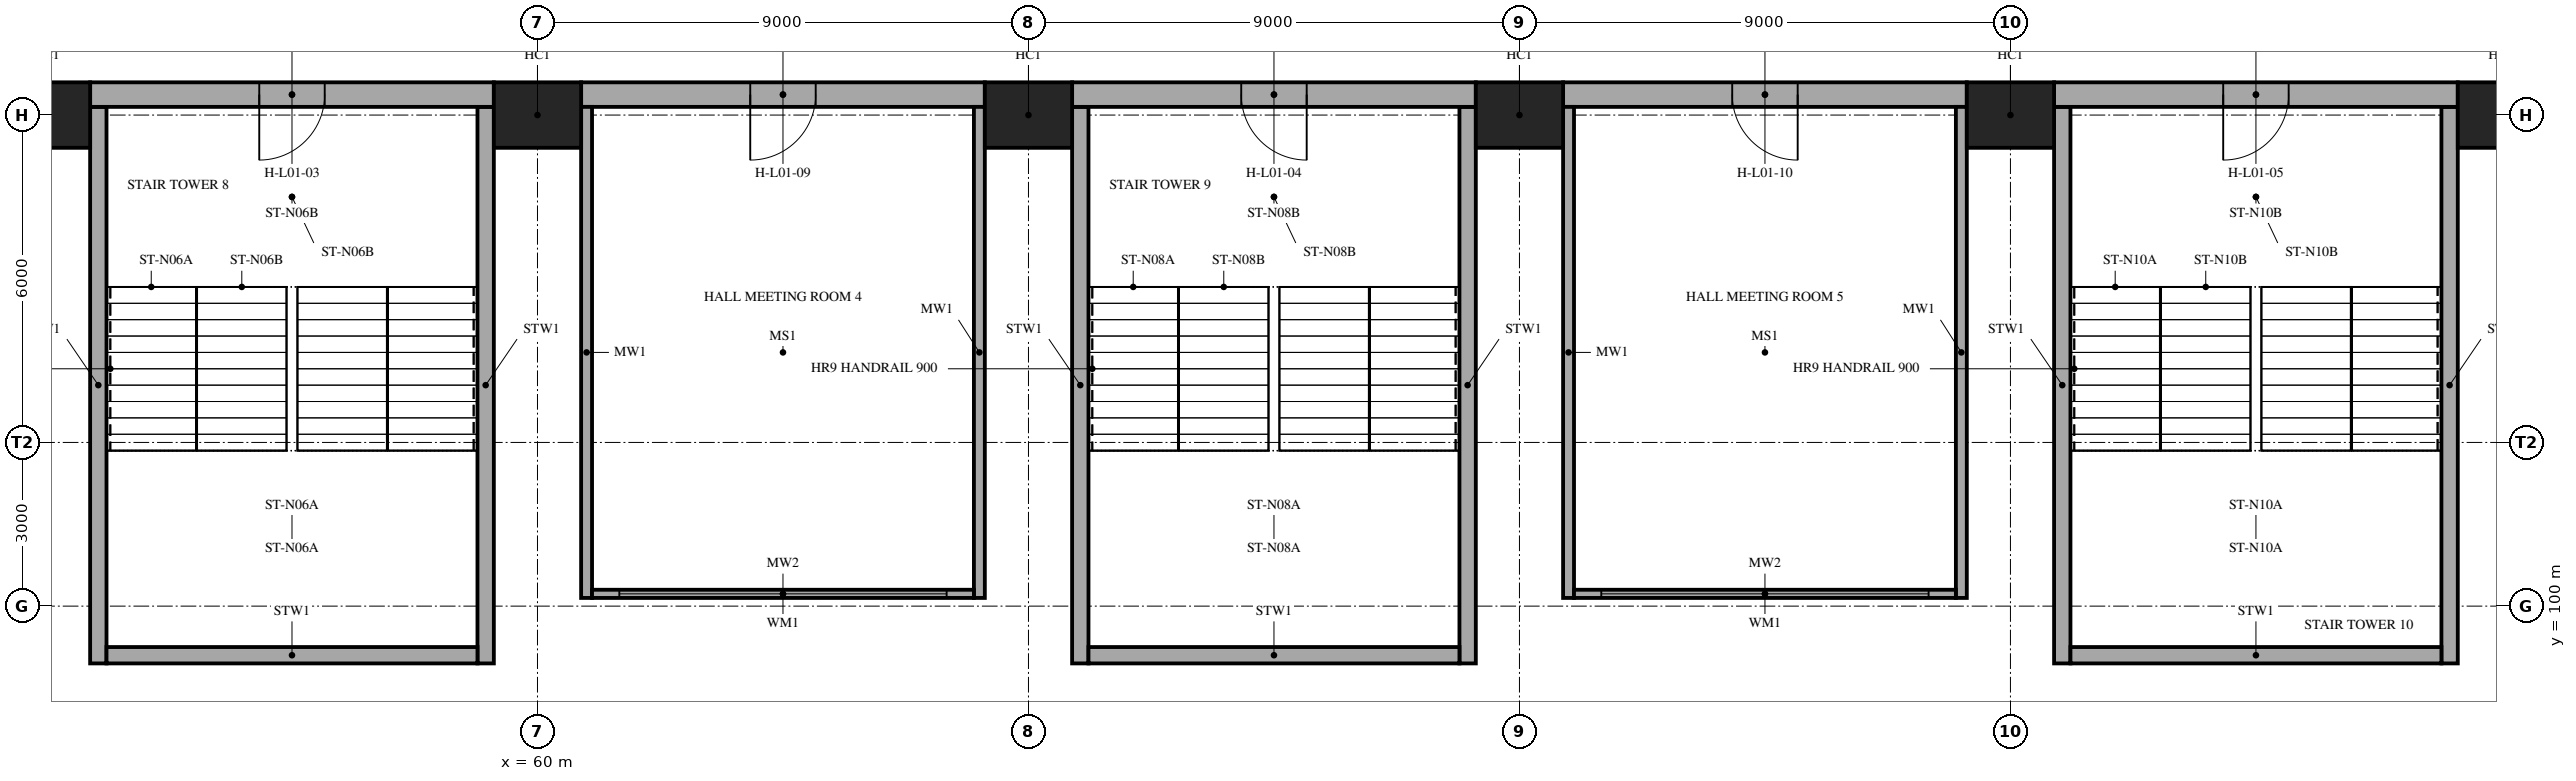
"""IFC4 building model, lengths in metres.
Left out: names, types, materials, properties, quantities, classifications, styles, units other than length and angle.
Written with IfcOpenShell. Run it as: python <this file> out.ifc"""

import sys

from ifc_helpers import new_model, si_unit, direction, frame, frame_2d, origin, origin_2d, place, context, subcontext, project, spatial, rectangle, extrude, element, fill, save


model = new_model("IFC4")
c1 = context("Model", 3, precision=1e-05, world=origin(), true_north=direction((0.0, 1.0)))
c2 = subcontext(c1, "Body", "Model", "MODEL_VIEW")
j1 = project(units=[si_unit("LENGTHUNIT", "METRE"), si_unit("PLANEANGLEUNIT", "RADIAN")], contexts=[c1])
p1 = place(None, origin())
s1 = spatial("IfcSite", under=j1, at=p1, CompositionType="ELEMENT")
p2 = place(p1, origin())
s2 = spatial("IfcBuilding", under=s1, at=p2, CompositionType="ELEMENT")
p3 = place(p2, frame((0.0, 0.0, 5.0)))
s3 = spatial("IfcBuildingStorey", under=s2, at=p3, CompositionType="ELEMENT", Elevation=5.0)
for number, where, z_axis, x_axis in (
    (1, (51.0, 109.0, 0.0), (0.0, 0.0, 1.0), (1.0, 0.0, 0.0)),
    (2, (60.0, 109.0, 0.0), (0.0, 0.0, 1.0), (1.0, 0.0, 0.0)),
    (3, (69.0, 109.0, 0.0), (0.0, 0.0, 1.0), (1.0, 0.0, 0.0)),
    (4, (78.0, 109.0, 0.0), (0.0, 0.0, 1.0), (1.0, 0.0, 0.0)),
    (5, (87.0, 109.0, 0.0), (0.0, 0.0, 1.0), (1.0, 0.0, 0.0)),
    (6, (96.0, 109.0, 0.0), (0.0, 0.0, 1.0), (1.0, 0.0, 0.0)),
):
    element("IfcColumn", number, at=place(p3, frame(where, z_axis=z_axis, x_axis=x_axis)), inside=s3, PredefinedType="COLUMN", context=c2, shape_type="SweptSolid", body=[
        extrude(rectangle(XDim=1.6, YDim=1.2, at=origin_2d()), origin(), (0.0, 0.0, 1.0), 5.0),
    ])
for number, where, z_axis, x_axis in (
    (7, (51.95, 109.15, 0.0), (0.0, 0.0, 1.0), (0.0, -1.0, 0.0)),
    (8, (59.05, 109.15, 0.0), (0.0, 0.0, 1.0), (0.0, -1.0, 0.0)),
):
    element("IfcWall", number, at=place(p3, frame(where, z_axis=z_axis, x_axis=x_axis)), inside=s3, PredefinedType="SHEAR", context=c2, shape_type="SweptSolid", body=[
        extrude(rectangle(XDim=10.2, YDim=0.3, at=frame_2d((5.1, 0.0))), origin(), (0.0, 0.0, 1.0), 5.0),
    ])
p4 = place(p3, frame((52.1, 99.1, 0.0), z_axis=(0.0, 0.0, 1.0), x_axis=(1.0, 0.0, 0.0)))
e9 = element("IfcWall", 9, at=p4, inside=s3, PredefinedType="SHEAR", context=c2, shape_type="SweptSolid", body=[
    extrude(rectangle(XDim=6.8, YDim=0.3, at=frame_2d((3.4, 0.0))), origin(), (0.0, 0.0, 1.0), 5.0),
])
for number, where, z_axis, x_axis in (
    (10, (69.95, 109.15, 0.0), (0.0, 0.0, 1.0), (0.0, -1.0, 0.0)),
    (11, (77.05, 109.15, 0.0), (0.0, 0.0, 1.0), (0.0, -1.0, 0.0)),
):
    element("IfcWall", number, at=place(p3, frame(where, z_axis=z_axis, x_axis=x_axis)), inside=s3, PredefinedType="SHEAR", context=c2, shape_type="SweptSolid", body=[
        extrude(rectangle(XDim=10.2, YDim=0.3, at=frame_2d((5.1, 0.0))), origin(), (0.0, 0.0, 1.0), 5.0),
    ])
p5 = place(p3, frame((70.1, 99.1, 0.0), z_axis=(0.0, 0.0, 1.0), x_axis=(1.0, 0.0, 0.0)))
e12 = element("IfcWall", 12, at=p5, inside=s3, PredefinedType="SHEAR", context=c2, shape_type="SweptSolid", body=[
    extrude(rectangle(XDim=6.8, YDim=0.3, at=frame_2d((3.4, 0.0))), origin(), (0.0, 0.0, 1.0), 5.0),
])
for number, where, z_axis, x_axis in (
    (13, (87.95, 109.15, 0.0), (0.0, 0.0, 1.0), (0.0, -1.0, 0.0)),
    (14, (95.05, 109.15, 0.0), (0.0, 0.0, 1.0), (0.0, -1.0, 0.0)),
):
    element("IfcWall", number, at=place(p3, frame(where, z_axis=z_axis, x_axis=x_axis)), inside=s3, PredefinedType="SHEAR", context=c2, shape_type="SweptSolid", body=[
        extrude(rectangle(XDim=10.2, YDim=0.3, at=frame_2d((5.1, 0.0))), origin(), (0.0, 0.0, 1.0), 5.0),
    ])
p6 = place(p3, frame((88.1, 99.1, 0.0), z_axis=(0.0, 0.0, 1.0), x_axis=(1.0, 0.0, 0.0)))
e15 = element("IfcWall", 15, at=p6, inside=s3, PredefinedType="SHEAR", context=c2, shape_type="SweptSolid", body=[
    extrude(rectangle(XDim=6.8, YDim=0.3, at=frame_2d((3.4, 0.0))), origin(), (0.0, 0.0, 1.0), 5.0),
])
p7 = place(p3, frame((51.8, 109.375, 0.0), z_axis=(0.0, 0.0, 1.0), x_axis=(1.0, 0.0, 0.0)))
e16 = element("IfcWall", 16, at=p7, inside=s3, PredefinedType="SOLIDWALL", context=c2, shape_type="SweptSolid", body=[
    extrude(rectangle(XDim=7.4, YDim=0.45, at=frame_2d((3.7, 0.0))), origin(), (0.0, 0.0, 1.0), 5.0),
])
p8 = place(p7, frame((3.1, 0.0, 0.0)))
e17 = element("IfcOpeningElement", 17, at=p8, cuts=e16, PredefinedType="OPENING", context=c2, shape_type="SweptSolid", body=[
    extrude(rectangle(XDim=1.2, YDim=2.1, at=frame_2d((0.6, 1.05))), frame((0.0, 0.235, 0.0), z_axis=(0.0, -1.0, 0.0), x_axis=(1.0, 0.0, 0.0)), (0.0, 0.0, 1.0), 0.47),
])
p9 = place(p3, frame((60.8, 109.375, 0.0), z_axis=(0.0, 0.0, 1.0), x_axis=(1.0, 0.0, 0.0)))
e18 = element("IfcWall", 18, at=p9, inside=s3, PredefinedType="SOLIDWALL", context=c2, shape_type="SweptSolid", body=[
    extrude(rectangle(XDim=7.4, YDim=0.45, at=frame_2d((3.7, 0.0))), origin(), (0.0, 0.0, 1.0), 5.0),
])
p10 = place(p9, frame((3.1, 0.0, 0.0)))
e19 = element("IfcOpeningElement", 19, at=p10, cuts=e18, PredefinedType="OPENING", context=c2, shape_type="SweptSolid", body=[
    extrude(rectangle(XDim=1.2, YDim=2.1, at=frame_2d((0.6, 1.05))), frame((0.0, 0.235, 0.0), z_axis=(0.0, -1.0, 0.0), x_axis=(1.0, 0.0, 0.0)), (0.0, 0.0, 1.0), 0.47),
])
p11 = place(p3, frame((69.8, 109.375, 0.0), z_axis=(0.0, 0.0, 1.0), x_axis=(1.0, 0.0, 0.0)))
e20 = element("IfcWall", 20, at=p11, inside=s3, PredefinedType="SOLIDWALL", context=c2, shape_type="SweptSolid", body=[
    extrude(rectangle(XDim=7.4, YDim=0.45, at=frame_2d((3.7, 0.0))), origin(), (0.0, 0.0, 1.0), 5.0),
])
p12 = place(p11, frame((3.1, 0.0, 0.0)))
e21 = element("IfcOpeningElement", 21, at=p12, cuts=e20, PredefinedType="OPENING", context=c2, shape_type="SweptSolid", body=[
    extrude(rectangle(XDim=1.2, YDim=2.1, at=frame_2d((0.6, 1.05))), frame((0.0, 0.235, 0.0), z_axis=(0.0, -1.0, 0.0), x_axis=(1.0, 0.0, 0.0)), (0.0, 0.0, 1.0), 0.47),
])
p13 = place(p3, frame((78.8, 109.375, 0.0), z_axis=(0.0, 0.0, 1.0), x_axis=(1.0, 0.0, 0.0)))
e22 = element("IfcWall", 22, at=p13, inside=s3, PredefinedType="SOLIDWALL", context=c2, shape_type="SweptSolid", body=[
    extrude(rectangle(XDim=7.4, YDim=0.45, at=frame_2d((3.7, 0.0))), origin(), (0.0, 0.0, 1.0), 5.0),
])
p14 = place(p13, frame((3.1, 0.0, 0.0)))
e23 = element("IfcOpeningElement", 23, at=p14, cuts=e22, PredefinedType="OPENING", context=c2, shape_type="SweptSolid", body=[
    extrude(rectangle(XDim=1.2, YDim=2.1, at=frame_2d((0.6, 1.05))), frame((0.0, 0.235, 0.0), z_axis=(0.0, -1.0, 0.0), x_axis=(1.0, 0.0, 0.0)), (0.0, 0.0, 1.0), 0.47),
])
p15 = place(p3, frame((87.8, 109.375, 0.0), z_axis=(0.0, 0.0, 1.0), x_axis=(1.0, 0.0, 0.0)))
e24 = element("IfcWall", 24, at=p15, inside=s3, PredefinedType="SOLIDWALL", context=c2, shape_type="SweptSolid", body=[
    extrude(rectangle(XDim=7.4, YDim=0.45, at=frame_2d((3.7, 0.0))), origin(), (0.0, 0.0, 1.0), 5.0),
])
p16 = place(p15, frame((3.1, 0.0, 0.0)))
e25 = element("IfcOpeningElement", 25, at=p16, cuts=e24, PredefinedType="OPENING", context=c2, shape_type="SweptSolid", body=[
    extrude(rectangle(XDim=1.2, YDim=2.1, at=frame_2d((0.6, 1.05))), frame((0.0, 0.235, 0.0), z_axis=(0.0, -1.0, 0.0), x_axis=(1.0, 0.0, 0.0)), (0.0, 0.0, 1.0), 0.47),
])
for number, where, z_axis, x_axis in (
    (26, (60.9, 100.15, 0.0), (0.0, 0.0, 1.0), (0.0, 1.0, 0.0)),
    (27, (68.1, 100.15, 0.0), (0.0, 0.0, 1.0), (0.0, 1.0, 0.0)),
):
    element("IfcWall", number, at=place(p3, frame(where, z_axis=z_axis, x_axis=x_axis)), inside=s3, PredefinedType="SHEAR", context=c2, shape_type="SweptSolid", body=[
        extrude(rectangle(XDim=9.0, YDim=0.2, at=frame_2d((4.5, 0.0))), origin(), (0.0, 0.0, 1.0), 4.75),
    ])
p17 = place(p3, frame((61.0, 100.225, 0.0), z_axis=(0.0, 0.0, 1.0), x_axis=(1.0, 0.0, 0.0)))
e28 = element("IfcWall", 28, at=p17, inside=s3, PredefinedType="PARTITIONING", context=c2, shape_type="SweptSolid", body=[
    extrude(rectangle(XDim=7.0, YDim=0.15, at=frame_2d((3.5, 0.0))), origin(), (0.0, 0.0, 1.0), 4.75),
])
p18 = place(p17, frame((0.5, 0.0, 0.9)))
e29 = element("IfcOpeningElement", 29, at=p18, cuts=e28, PredefinedType="OPENING", context=c2, shape_type="SweptSolid", body=[
    extrude(rectangle(XDim=6.0, YDim=2.7, at=frame_2d((3.0, 1.35))), frame((0.0, 0.085, 0.0), z_axis=(0.0, -1.0, 0.0), x_axis=(1.0, 0.0, 0.0)), (0.0, 0.0, 1.0), 0.17),
])
for number, where, z_axis, x_axis in (
    (30, (78.9, 100.15, 0.0), (0.0, 0.0, 1.0), (0.0, 1.0, 0.0)),
    (31, (86.1, 100.15, 0.0), (0.0, 0.0, 1.0), (0.0, 1.0, 0.0)),
):
    element("IfcWall", number, at=place(p3, frame(where, z_axis=z_axis, x_axis=x_axis)), inside=s3, PredefinedType="SHEAR", context=c2, shape_type="SweptSolid", body=[
        extrude(rectangle(XDim=9.0, YDim=0.2, at=frame_2d((4.5, 0.0))), origin(), (0.0, 0.0, 1.0), 4.75),
    ])
p19 = place(p3, frame((79.0, 100.225, 0.0), z_axis=(0.0, 0.0, 1.0), x_axis=(1.0, 0.0, 0.0)))
e32 = element("IfcWall", 32, at=p19, inside=s3, PredefinedType="PARTITIONING", context=c2, shape_type="SweptSolid", body=[
    extrude(rectangle(XDim=7.0, YDim=0.15, at=frame_2d((3.5, 0.0))), origin(), (0.0, 0.0, 1.0), 4.75),
])
p20 = place(p19, frame((0.5, 0.0, 0.9)))
e33 = element("IfcOpeningElement", 33, at=p20, cuts=e32, PredefinedType="OPENING", context=c2, shape_type="SweptSolid", body=[
    extrude(rectangle(XDim=6.0, YDim=2.7, at=frame_2d((3.0, 1.35))), frame((0.0, 0.085, 0.0), z_axis=(0.0, -1.0, 0.0), x_axis=(1.0, 0.0, 0.0)), (0.0, 0.0, 1.0), 0.17),
])
p21 = place(p8, frame((1.2, 0.0, 0.0), z_axis=(0.0, 0.0, 1.0), x_axis=(-1.0, 0.0, 0.0)))
e34 = element("IfcDoor", 34, at=p21, inside=s3, OperationType="SINGLE_SWING_RIGHT", PredefinedType="DOOR", context=c2, shape_type="SweptSolid", body=[
    extrude(rectangle(XDim=1.2, YDim=2.1, at=frame_2d((0.6, 1.05))), frame((0.0, 0.025, 0.0), z_axis=(0.0, -1.0, 0.0), x_axis=(1.0, 0.0, 0.0)), (0.0, 0.0, 1.0), 0.05),
])
fill(e17, e34)
p22 = place(p12, frame((1.2, 0.0, 0.0), z_axis=(0.0, 0.0, 1.0), x_axis=(-1.0, 0.0, 0.0)))
e35 = element("IfcDoor", 35, at=p22, inside=s3, OperationType="SINGLE_SWING_LEFT", PredefinedType="DOOR", context=c2, shape_type="SweptSolid", body=[
    extrude(rectangle(XDim=1.2, YDim=2.1, at=frame_2d((0.6, 1.05))), frame((0.0, 0.025, 0.0), z_axis=(0.0, -1.0, 0.0), x_axis=(1.0, 0.0, 0.0)), (0.0, 0.0, 1.0), 0.05),
])
fill(e21, e35)
p23 = place(p16, frame((1.2, 0.0, 0.0), z_axis=(0.0, 0.0, 1.0), x_axis=(-1.0, 0.0, 0.0)))
e36 = element("IfcDoor", 36, at=p23, inside=s3, OperationType="SINGLE_SWING_RIGHT", PredefinedType="DOOR", context=c2, shape_type="SweptSolid", body=[
    extrude(rectangle(XDim=1.2, YDim=2.1, at=frame_2d((0.6, 1.05))), frame((0.0, 0.025, 0.0), z_axis=(0.0, -1.0, 0.0), x_axis=(1.0, 0.0, 0.0)), (0.0, 0.0, 1.0), 0.05),
])
fill(e25, e36)
p24 = place(p18, origin())
e37 = element("IfcWindow", 37, at=p24, inside=s3, PartitioningType="TRIPLE_PANEL_VERTICAL", PredefinedType="WINDOW", context=c2, shape_type="SweptSolid", body=[
    extrude(rectangle(XDim=6.0, YDim=2.7, at=frame_2d((3.0, 1.35))), frame((0.0, 0.03, 0.0), z_axis=(0.0, -1.0, 0.0), x_axis=(1.0, 0.0, 0.0)), (0.0, 0.0, 1.0), 0.06),
])
fill(e29, e37)
p25 = place(p10, frame((1.2, 0.0, 0.0), z_axis=(0.0, 0.0, 1.0), x_axis=(-1.0, 0.0, 0.0)))
e38 = element("IfcDoor", 38, at=p25, inside=s3, OperationType="SINGLE_SWING_RIGHT", PredefinedType="DOOR", context=c2, shape_type="SweptSolid", body=[
    extrude(rectangle(XDim=1.2, YDim=2.1, at=frame_2d((0.6, 1.05))), frame((0.0, 0.025, 0.0), z_axis=(0.0, -1.0, 0.0), x_axis=(1.0, 0.0, 0.0)), (0.0, 0.0, 1.0), 0.05),
])
fill(e19, e38)
p26 = place(p20, origin())
e39 = element("IfcWindow", 39, at=p26, inside=s3, PartitioningType="TRIPLE_PANEL_VERTICAL", PredefinedType="WINDOW", context=c2, shape_type="SweptSolid", body=[
    extrude(rectangle(XDim=6.0, YDim=2.7, at=frame_2d((3.0, 1.35))), frame((0.0, 0.03, 0.0), z_axis=(0.0, -1.0, 0.0), x_axis=(1.0, 0.0, 0.0)), (0.0, 0.0, 1.0), 0.06),
])
fill(e33, e39)
p27 = place(p14, frame((1.2, 0.0, 0.0), z_axis=(0.0, 0.0, 1.0), x_axis=(-1.0, 0.0, 0.0)))
e40 = element("IfcDoor", 40, at=p27, inside=s3, OperationType="SINGLE_SWING_LEFT", PredefinedType="DOOR", context=c2, shape_type="SweptSolid", body=[
    extrude(rectangle(XDim=1.2, YDim=2.1, at=frame_2d((0.6, 1.05))), frame((0.0, 0.025, 0.0), z_axis=(0.0, -1.0, 0.0), x_axis=(1.0, 0.0, 0.0)), (0.0, 0.0, 1.0), 0.05),
])
fill(e23, e40)
save(model, sys.argv[1])
